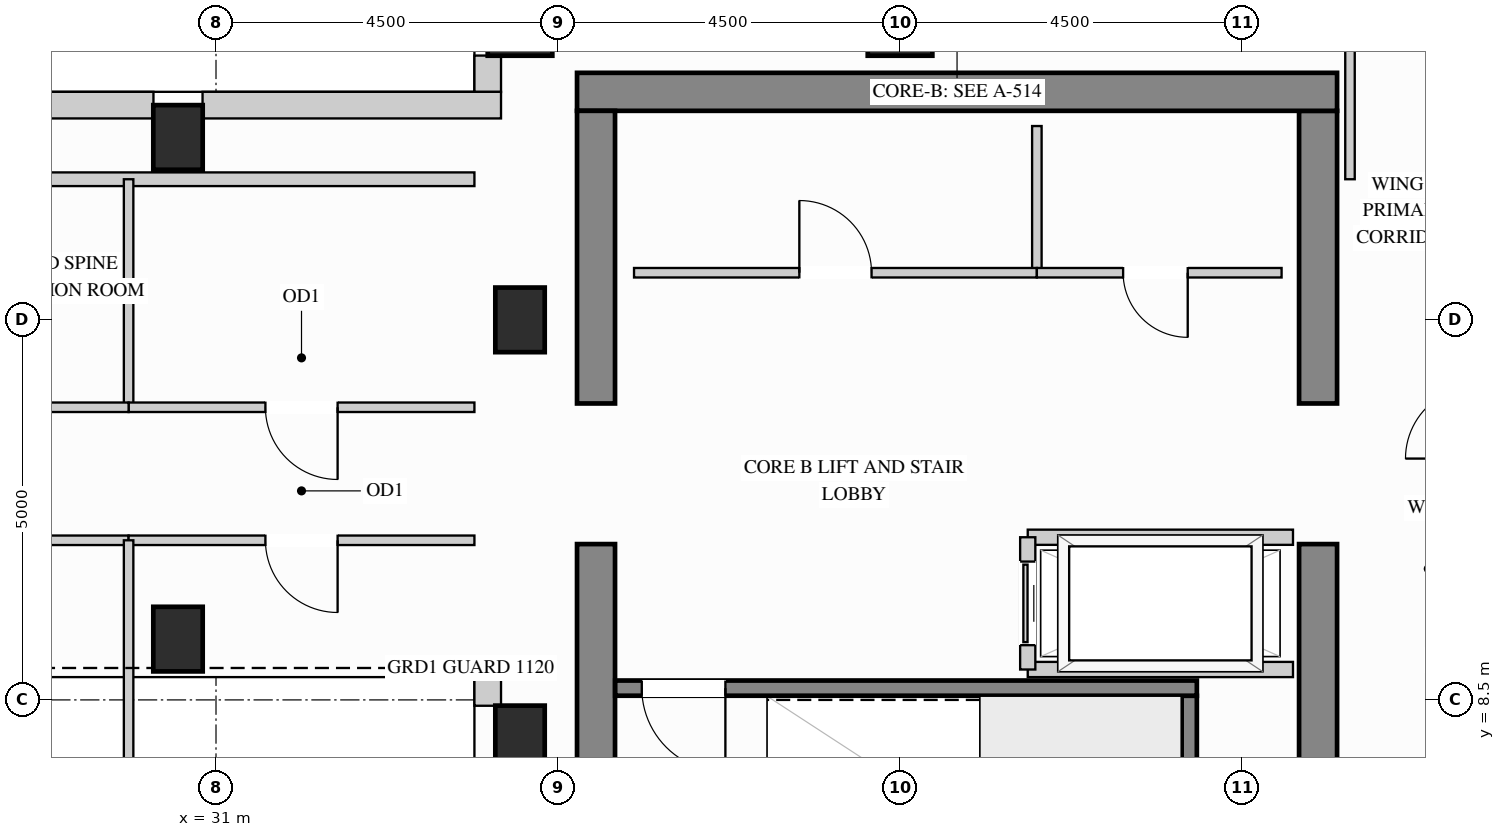
"""IFC4 building model, lengths in metres.
Left out: names, types, materials, properties, quantities, classifications, styles, units other than length and angle.
Written with IfcOpenShell. Run it as: python <this file> out.ifc"""

import sys

from ifc_helpers import new_model, si_unit, direction, frame, frame_2d, origin, origin_2d, place, context, subcontext, project, spatial, rectangle, extrude, source, transform, mapped, element, fill, save


model = new_model("IFC4")
c1 = context("Model", 3, precision=1e-05, world=origin(), true_north=direction((0.0, 1.0)))
c2 = subcontext(c1, "Body", "Model", "MODEL_VIEW")
j1 = project(units=[si_unit("LENGTHUNIT", "METRE"), si_unit("PLANEANGLEUNIT", "RADIAN")], contexts=[c1])
p1 = place(None, origin())
s1 = spatial("IfcSite", under=j1, at=p1, CompositionType="ELEMENT")
p2 = place(p1, origin())
s2 = spatial("IfcBuilding", under=s1, at=p2, CompositionType="ELEMENT")
p3 = place(p2, frame((0.0, 0.0, 241.2)))
s3 = spatial("IfcBuildingStorey", under=s2, at=p3, CompositionType="ELEMENT", Elevation=241.2)
m1 = source(origin(), c2, "Body", "SweptSolid", [
    extrude(rectangle(XDim=0.65, YDim=0.85, at=origin_2d()), origin(), (0.0, 0.0, 1.0), 3.4),
])
for number, where, z_axis, x_axis in (
    (1, (35.0, 13.5, 0.0), (0.0, 0.0, 1.0), (1.0, 0.0, 0.0)),
    (2, (35.0, 8.0, 0.0), (0.0, 0.0, 1.0), (1.0, 0.0, 0.0)),
    (3, (30.5, 15.9, 0.0), (0.0, 0.0, 1.0), (1.0, 0.0, 0.0)),
    (4, (30.5, 9.3, 0.0), (0.0, 0.0, 1.0), (1.0, 0.0, 0.0)),
):
    element("IfcColumn", number, at=place(p3, frame(where, z_axis=z_axis, x_axis=x_axis)), inside=s3, PredefinedType="COLUMN", context=c2, shape_type="MappedRepresentation", body=[
        mapped(m1, transform((0.0, 0.0, 0.0), x_axis=(1.0, 0.0, 0.0), y_axis=(0.0, 1.0, 0.0), z_axis=(0.0, 0.0, 1.0))),
    ])
m2 = source(origin(), c2, "Body", "SweptSolid", [
    extrude(rectangle(XDim=0.85, YDim=0.85, at=origin_2d()), origin(), (0.0, 0.0, 1.0), 3.4),
])
for number, where, z_axis, x_axis in (
    (5, (35.0, 17.4, 0.0), (0.0, 0.0, 1.0), (1.0, 0.0, 0.0)),
    (6, (40.0, 17.4, 0.0), (0.0, 0.0, 1.0), (1.0, 0.0, 0.0)),
):
    element("IfcColumn", number, at=place(p3, frame(where, z_axis=z_axis, x_axis=x_axis)), inside=s3, PredefinedType="COLUMN", context=c2, shape_type="MappedRepresentation", body=[
        mapped(m2, transform((0.0, 0.0, 0.0), x_axis=(1.0, 0.0, 0.0), y_axis=(0.0, 1.0, 0.0), z_axis=(0.0, 0.0, 1.0))),
    ])
m3 = source(origin(), c2, "Body", "SweptSolid", [
    extrude(rectangle(XDim=5.8, YDim=0.5, at=frame_2d((2.9, 0.0))), origin(), (0.0, 0.0, 1.0), 3.4),
])
p4 = place(p3, frame((45.5, 4.75, 0.0), z_axis=(0.0, 0.0, 1.0), x_axis=(0.0, 1.0, 0.0)))
e7 = element("IfcWall", 7, at=p4, inside=s3, PredefinedType="SHEAR", context=c2, shape_type="MappedRepresentation", body=[
    mapped(m3, transform((0.0, 0.0, 0.0), x_axis=(1.0, 0.0, 0.0), y_axis=(0.0, 1.0, 0.0), z_axis=(0.0, 0.0, 1.0))),
])
m4 = source(origin(), c2, "Body", "SweptSolid", [
    extrude(rectangle(XDim=3.85, YDim=0.5, at=frame_2d((1.925, 0.0))), origin(), (0.0, 0.0, 1.0), 3.4),
])
p5 = place(p3, frame((45.5, 12.4, 0.0), z_axis=(0.0, 0.0, 1.0), x_axis=(0.0, 1.0, 0.0)))
e8 = element("IfcWall", 8, at=p5, inside=s3, PredefinedType="SHEAR", context=c2, shape_type="MappedRepresentation", body=[
    mapped(m4, transform((0.0, 0.0, 0.0), x_axis=(1.0, 0.0, 0.0), y_axis=(0.0, 1.0, 0.0), z_axis=(0.0, 0.0, 1.0))),
])
m5 = source(origin(), c2, "Body", "SweptSolid", [
    extrude(rectangle(XDim=10.0, YDim=0.5, at=frame_2d((5.0, 0.0))), origin(), (0.0, 0.0, 1.0), 3.4),
])
p6 = place(p3, frame((35.75, 16.5, 0.0), z_axis=(0.0, 0.0, 1.0), x_axis=(1.0, 0.0, 0.0)))
e9 = element("IfcWall", 9, at=p6, inside=s3, PredefinedType="SHEAR", context=c2, shape_type="MappedRepresentation", body=[
    mapped(m5, transform((0.0, 0.0, 0.0), x_axis=(1.0, 0.0, 0.0), y_axis=(0.0, 1.0, 0.0), z_axis=(0.0, 0.0, 1.0))),
])
p7 = place(p3, frame((36.0, 4.75, 0.0), z_axis=(0.0, 0.0, 1.0), x_axis=(0.0, 1.0, 0.0)))
e10 = element("IfcWall", 10, at=p7, inside=s3, PredefinedType="SHEAR", context=c2, shape_type="MappedRepresentation", body=[
    mapped(m3, transform((0.0, 0.0, 0.0), x_axis=(1.0, 0.0, 0.0), y_axis=(0.0, 1.0, 0.0), z_axis=(0.0, 0.0, 1.0))),
])
p8 = place(p3, frame((36.0, 12.4, 0.0), z_axis=(0.0, 0.0, 1.0), x_axis=(0.0, 1.0, 0.0)))
e11 = element("IfcWall", 11, at=p8, inside=s3, PredefinedType="SHEAR", context=c2, shape_type="MappedRepresentation", body=[
    mapped(m4, transform((0.0, 0.0, 0.0), x_axis=(1.0, 0.0, 0.0), y_axis=(0.0, 1.0, 0.0), z_axis=(0.0, 0.0, 1.0))),
])
m6 = source(origin(), c2, "Body", "SweptSolid", [
    extrude(rectangle(XDim=0.379, YDim=0.35, at=frame_2d((0.189, 0.0))), origin(), (0.0, 0.0, 1.0), 3.385),
])
p9 = place(p3, frame((34.575, 8.802, 0.0), z_axis=(0.0, 0.0, 1.0), x_axis=(0.0, -1.0, 0.0)))
e12 = element("IfcWall", 12, at=p9, inside=s3, PredefinedType="SOLIDWALL", context=c2, shape_type="MappedRepresentation", body=[
    mapped(m6, transform((0.0, 0.0, 0.0), x_axis=(1.0, 0.0, 0.0), y_axis=(0.0, 1.0, 0.0), z_axis=(0.0, 0.0, 1.0))),
])
m7 = source(origin(), c2, "Body", "SweptSolid", [
    extrude(rectangle(XDim=0.479, YDim=0.35, at=frame_2d((0.24, 0.0))), origin(), (0.0, 0.0, 1.0), 3.385),
])
p10 = place(p3, frame((34.575, 16.977, 0.0), z_axis=(0.0, 0.0, 1.0), x_axis=(0.0, -1.0, 0.0)))
e13 = element("IfcWall", 13, at=p10, inside=s3, PredefinedType="SOLIDWALL", context=c2, shape_type="MappedRepresentation", body=[
    mapped(m7, transform((0.0, 0.0, 0.0), x_axis=(1.0, 0.0, 0.0), y_axis=(0.0, 1.0, 0.0), z_axis=(0.0, 0.0, 1.0))),
])
m8 = source(origin(), c2, "Body", "SweptSolid", [
    extrude(rectangle(XDim=3.927, YDim=0.35, at=frame_2d((1.963, 0.0))), origin(), (0.0, 0.0, 1.0), 3.385),
])
p11 = place(p3, frame((34.75, 16.325, 0.0), z_axis=(0.0, 0.0, 1.0), x_axis=(-1.0, 0.0, 0.0)))
e14 = element("IfcWall", 14, at=p11, inside=s3, PredefinedType="SOLIDWALL", context=c2, shape_type="MappedRepresentation", body=[
    mapped(m8, transform((0.0, 0.0, 0.0), x_axis=(1.0, 0.0, 0.0), y_axis=(0.0, 1.0, 0.0), z_axis=(0.0, 0.0, 1.0))),
])
m9 = source(origin(), c2, "Body", "SweptSolid", [
    extrude(rectangle(XDim=6.454, YDim=0.35, at=frame_2d((3.227, 0.0))), origin(), (0.0, 0.0, 1.0), 3.385),
])
p12 = place(p3, frame((30.177, 16.325, 0.0), z_axis=(0.0, 0.0, 1.0), x_axis=(-1.0, 0.0, 0.0)))
e15 = element("IfcWall", 15, at=p12, inside=s3, PredefinedType="SOLIDWALL", context=c2, shape_type="MappedRepresentation", body=[
    mapped(m9, transform((0.0, 0.0, 0.0), x_axis=(1.0, 0.0, 0.0), y_axis=(0.0, 1.0, 0.0), z_axis=(0.0, 0.0, 1.0))),
])
m10 = source(origin(), c2, "Body", "SweptSolid", [
    extrude(rectangle(XDim=15.25, YDim=0.18, at=frame_2d((7.625, 0.0))), origin(), (0.0, 0.0, 1.0), 3.385),
])
p13 = place(p3, frame((19.15, 15.35, 0.0), z_axis=(0.0, 0.0, 1.0), x_axis=(1.0, 0.0, 0.0)))
e16 = element("IfcWall", 16, at=p13, inside=s3, PredefinedType="PARTITIONING", context=c2, shape_type="MappedRepresentation", body=[
    mapped(m10, transform((0.0, 0.0, 0.0), x_axis=(1.0, 0.0, 0.0), y_axis=(0.0, 1.0, 0.0), z_axis=(0.0, 0.0, 1.0))),
])
m11 = source(origin(), c2, "Body", "SweptSolid", [
    extrude(rectangle(XDim=1.93, YDim=0.125, at=frame_2d((0.965, 0.0))), origin(), (0.0, 0.0, 1.0), 3.385),
])
p14 = place(p3, frame((41.8, 14.12, 0.0), z_axis=(0.0, 0.0, 1.0), x_axis=(0.0, 1.0, 0.0)))
e17 = element("IfcWall", 17, at=p14, inside=s3, PredefinedType="PARTITIONING", context=c2, shape_type="MappedRepresentation", body=[
    mapped(m11, transform((0.0, 0.0, 0.0), x_axis=(1.0, 0.0, 0.0), y_axis=(0.0, 1.0, 0.0), z_axis=(0.0, 0.0, 1.0))),
])
p15 = place(p3, frame((36.5, 14.12, 0.0), z_axis=(0.0, 0.0, 1.0), x_axis=(1.0, 0.0, 0.0)))
e18 = element("IfcWall", 18, at=p15, inside=s3, PredefinedType="PARTITIONING", context=c2, shape_type="SweptSolid", body=[
    extrude(rectangle(XDim=5.3, YDim=0.125, at=frame_2d((2.65, 0.0))), origin(), (0.0, 0.0, 1.0), 3.385),
])
p16 = place(p15, frame((2.175, 0.0, 0.0)))
e19 = element("IfcOpeningElement", 19, at=p16, cuts=e18, PredefinedType="OPENING", context=c2, shape_type="SweptSolid", body=[
    extrude(rectangle(XDim=0.95, YDim=2.15, at=frame_2d((0.475, 1.075))), frame((0.0, 0.073, 0.0), z_axis=(0.0, -1.0, 0.0), x_axis=(1.0, 0.0, 0.0)), (0.0, 0.0, 1.0), 0.145),
])
p17 = place(p3, frame((41.8, 14.12, 0.0), z_axis=(0.0, 0.0, 1.0), x_axis=(1.0, 0.0, 0.0)))
e20 = element("IfcWall", 20, at=p17, inside=s3, PredefinedType="PARTITIONING", context=c2, shape_type="SweptSolid", body=[
    extrude(rectangle(XDim=3.22, YDim=0.125, at=frame_2d((1.61, 0.0))), origin(), (0.0, 0.0, 1.0), 3.385),
])
p18 = place(p17, frame((1.135, 0.0, 0.0)))
e21 = element("IfcOpeningElement", 21, at=p18, cuts=e20, PredefinedType="OPENING", context=c2, shape_type="SweptSolid", body=[
    extrude(rectangle(XDim=0.85, YDim=2.1, at=frame_2d((0.425, 1.05))), frame((0.0, 0.073, 0.0), z_axis=(0.0, -1.0, 0.0), x_axis=(1.0, 0.0, 0.0)), (0.0, 0.0, 1.0), 0.145),
])
m12 = source(origin(), c2, "Body", "SweptSolid", [
    extrude(rectangle(XDim=2.298, YDim=0.125, at=frame_2d((1.149, 0.0))), origin(), (0.0, 0.0, 1.0), 3.385),
])
p19 = place(p3, frame((45.92, 15.35, 0.0), z_axis=(0.0, 0.0, 1.0), x_axis=(0.0, 1.0, 0.0)))
e22 = element("IfcWall", 22, at=p19, inside=s3, PredefinedType="PARTITIONING", context=c2, shape_type="MappedRepresentation", body=[
    mapped(m12, transform((0.0, 0.0, 0.0), x_axis=(1.0, 0.0, 0.0), y_axis=(0.0, 1.0, 0.0), z_axis=(0.0, 0.0, 1.0))),
])
m13 = source(origin(), c2, "Body", "SweptSolid", [
    extrude(rectangle(XDim=3.0, YDim=0.125, at=frame_2d((1.5, 0.0))), origin(), (0.0, 0.0, 1.0), 3.385),
])
p20 = place(p3, frame((29.85, 12.35, 0.0), z_axis=(0.0, 0.0, 1.0), x_axis=(0.0, 1.0, 0.0)))
e23 = element("IfcWall", 23, at=p20, inside=s3, PredefinedType="PARTITIONING", context=c2, shape_type="MappedRepresentation", body=[
    mapped(m13, transform((0.0, 0.0, 0.0), x_axis=(1.0, 0.0, 0.0), y_axis=(0.0, 1.0, 0.0), z_axis=(0.0, 0.0, 1.0))),
])
p21 = place(p3, frame((29.85, 12.35, 0.0), z_axis=(0.0, 0.0, 1.0), x_axis=(1.0, 0.0, 0.0)))
e24 = element("IfcWall", 24, at=p21, inside=s3, PredefinedType="PARTITIONING", context=c2, shape_type="SweptSolid", body=[
    extrude(rectangle(XDim=4.55, YDim=0.125, at=frame_2d((2.275, 0.0))), origin(), (0.0, 0.0, 1.0), 3.385),
])
p22 = place(p21, frame((1.8, 0.0, 0.0)))
e25 = element("IfcOpeningElement", 25, at=p22, cuts=e24, PredefinedType="OPENING", context=c2, shape_type="SweptSolid", body=[
    extrude(rectangle(XDim=0.95, YDim=2.15, at=frame_2d((0.475, 1.075))), frame((0.0, 0.073, 0.0), z_axis=(0.0, -1.0, 0.0), x_axis=(1.0, 0.0, 0.0)), (0.0, 0.0, 1.0), 0.145),
])
p23 = place(p3, frame((24.05, 12.35, 0.0), z_axis=(0.0, 0.0, 1.0), x_axis=(1.0, 0.0, 0.0)))
e26 = element("IfcWall", 26, at=p23, inside=s3, PredefinedType="PARTITIONING", context=c2, shape_type="SweptSolid", body=[
    extrude(rectangle(XDim=5.8, YDim=0.125, at=frame_2d((2.9, 0.0))), origin(), (0.0, 0.0, 1.0), 3.385),
])
p24 = place(p23, frame((2.425, 0.0, 0.0)))
e27 = element("IfcOpeningElement", 27, at=p24, cuts=e26, PredefinedType="OPENING", context=c2, shape_type="SweptSolid", body=[
    extrude(rectangle(XDim=0.95, YDim=2.15, at=frame_2d((0.475, 1.075))), frame((0.0, 0.073, 0.0), z_axis=(0.0, -1.0, 0.0), x_axis=(1.0, 0.0, 0.0)), (0.0, 0.0, 1.0), 0.145),
])
p25 = place(p3, frame((23.85, 10.6, 0.0), z_axis=(0.0, 0.0, 1.0), x_axis=(1.0, 0.0, 0.0)))
e28 = element("IfcWall", 28, at=p25, inside=s3, PredefinedType="PARTITIONING", context=c2, shape_type="SweptSolid", body=[
    extrude(rectangle(XDim=6.0, YDim=0.125, at=frame_2d((3.0, 0.0))), origin(), (0.0, 0.0, 1.0), 3.385),
])
p26 = place(p25, frame((2.525, 0.0, 0.0)))
e29 = element("IfcOpeningElement", 29, at=p26, cuts=e28, PredefinedType="OPENING", context=c2, shape_type="SweptSolid", body=[
    extrude(rectangle(XDim=0.95, YDim=2.15, at=frame_2d((0.475, 1.075))), frame((0.0, 0.073, 0.0), z_axis=(0.0, -1.0, 0.0), x_axis=(1.0, 0.0, 0.0)), (0.0, 0.0, 1.0), 0.145),
])
p27 = place(p3, frame((29.85, 10.6, 0.0), z_axis=(0.0, 0.0, 1.0), x_axis=(1.0, 0.0, 0.0)))
e30 = element("IfcWall", 30, at=p27, inside=s3, PredefinedType="PARTITIONING", context=c2, shape_type="SweptSolid", body=[
    extrude(rectangle(XDim=4.55, YDim=0.125, at=frame_2d((2.275, 0.0))), origin(), (0.0, 0.0, 1.0), 3.385),
])
p28 = place(p27, frame((1.8, 0.0, 0.0)))
e31 = element("IfcOpeningElement", 31, at=p28, cuts=e30, PredefinedType="OPENING", context=c2, shape_type="SweptSolid", body=[
    extrude(rectangle(XDim=0.95, YDim=2.15, at=frame_2d((0.475, 1.075))), frame((0.0, 0.073, 0.0), z_axis=(0.0, -1.0, 0.0), x_axis=(1.0, 0.0, 0.0)), (0.0, 0.0, 1.0), 0.145),
])
m14 = source(origin(), c2, "Body", "SweptSolid", [
    extrude(rectangle(XDim=10.25, YDim=0.125, at=frame_2d((5.125, 0.0))), origin(), (0.0, 0.0, 1.0), 3.385),
])
p29 = place(p3, frame((29.85, 0.35, 0.0), z_axis=(0.0, 0.0, 1.0), x_axis=(0.0, 1.0, 0.0)))
e32 = element("IfcWall", 32, at=p29, inside=s3, PredefinedType="PARTITIONING", context=c2, shape_type="MappedRepresentation", body=[
    mapped(m14, transform((0.0, 0.0, 0.0), x_axis=(1.0, 0.0, 0.0), y_axis=(0.0, 1.0, 0.0), z_axis=(0.0, 0.0, 1.0))),
])
m15 = source(origin(), c2, "Body", "SweptSolid", [
    extrude(rectangle(XDim=3.49, YDim=0.2, at=frame_2d((1.745, 0.0))), origin(), (0.0, 0.0, 1.0), 3.385),
])
for number, where, z_axis, x_axis in (
    (33, (41.68, 10.64, 0.0), (0.0, 0.0, 1.0), (1.0, 0.0, 0.0)),
    (34, (41.68, 8.9, 0.0), (0.0, 0.0, 1.0), (1.0, 0.0, 0.0)),
):
    element("IfcWall", number, at=place(p3, frame(where, z_axis=z_axis, x_axis=x_axis)), inside=s3, PredefinedType="PARTITIONING", context=c2, shape_type="MappedRepresentation", body=[
        mapped(m15, transform((0.0, 0.0, 0.0), x_axis=(1.0, 0.0, 0.0), y_axis=(0.0, 1.0, 0.0), z_axis=(0.0, 0.0, 1.0))),
    ])
p30 = place(p3, frame((41.68, 8.9, 0.0), z_axis=(0.0, 0.0, 1.0), x_axis=(0.0, 1.0, 0.0)))
e35 = element("IfcWall", 35, at=p30, inside=s3, PredefinedType="PARTITIONING", context=c2, shape_type="SweptSolid", body=[
    extrude(rectangle(XDim=1.74, YDim=0.2, at=frame_2d((0.87, 0.0))), origin(), (0.0, 0.0, 1.0), 3.385),
])
p31 = place(p30, frame((0.32, 0.0, 0.0)))
e36 = element("IfcOpeningElement", 36, at=p31, cuts=e35, PredefinedType="OPENING", context=c2, shape_type="SweptSolid", body=[
    extrude(rectangle(XDim=1.1, YDim=2.2, at=frame_2d((0.55, 1.1))), frame((0.0, 0.11, 0.0), z_axis=(0.0, -1.0, 0.0), x_axis=(1.0, 0.0, 0.0)), (0.0, 0.0, 1.0), 0.22),
])
m16 = source(origin(), c2, "Body", "SweptSolid", [
    extrude(rectangle(XDim=3.803, YDim=0.2, at=frame_2d((1.901, 0.0))), origin(), (0.0, 0.0, 1.0), 3.4),
])
p32 = place(p3, frame((43.805, 4.752, 0.0), z_axis=(0.0, 0.0, 1.0), x_axis=(0.0, 1.0, 0.0)))
e37 = element("IfcWall", 37, at=p32, inside=s3, PredefinedType="SHEAR", context=c2, shape_type="MappedRepresentation", body=[
    mapped(m16, transform((0.0, 0.0, 0.0), x_axis=(1.0, 0.0, 0.0), y_axis=(0.0, 1.0, 0.0), z_axis=(0.0, 0.0, 1.0))),
])
p33 = place(p3, frame((36.252, 8.655, 0.0), z_axis=(0.0, 0.0, 1.0), x_axis=(1.0, 0.0, 0.0)))
e38 = element("IfcWall", 38, at=p33, inside=s3, PredefinedType="SHEAR", context=c2, shape_type="SweptSolid", body=[
    extrude(rectangle(XDim=7.653, YDim=0.2, at=frame_2d((3.827, 0.0))), origin(), (0.0, 0.0, 1.0), 3.4),
])
p34 = place(p33, frame((0.35, 0.0, 0.0)))
e39 = element("IfcOpeningElement", 39, at=p34, cuts=e38, PredefinedType="OPENING", context=c2, shape_type="SweptSolid", body=[
    extrude(rectangle(XDim=1.1, YDim=2.15, at=frame_2d((0.55, 1.075))), frame((0.0, 0.11, 0.0), z_axis=(0.0, -1.0, 0.0), x_axis=(1.0, 0.0, 0.0)), (0.0, 0.0, 1.0), 0.22),
])
m17 = source(origin(), c2, "Body", "SweptSolid", [
    extrude(rectangle(XDim=1.1, YDim=2.2, at=frame_2d((0.55, 1.1))), frame((0.0, 0.025, 0.0), z_axis=(0.0, -1.0, 0.0), x_axis=(1.0, 0.0, 0.0)), (0.0, 0.0, 1.0), 0.05),
])
p35 = place(p31, origin())
e40 = element("IfcDoor", 40, at=p35, inside=s3, OperationType="SLIDING_TO_LEFT", PredefinedType="DOOR", context=c2, shape_type="MappedRepresentation", body=[
    mapped(m17, transform((0.0, 0.0, 0.0), x_axis=(1.0, 0.0, 0.0), y_axis=(0.0, 1.0, 0.0), z_axis=(0.0, 0.0, 1.0))),
])
fill(e36, e40)
m18 = source(origin(), c2, "Body", "SweptSolid", [
    extrude(rectangle(XDim=0.95, YDim=2.15, at=frame_2d((0.475, 1.075))), frame((0.0, 0.025, 0.0), z_axis=(0.0, -1.0, 0.0), x_axis=(1.0, 0.0, 0.0)), (0.0, 0.0, 1.0), 0.05),
])
p36 = place(p16, origin())
e41 = element("IfcDoor", 41, at=p36, inside=s3, OperationType="SINGLE_SWING_LEFT", PredefinedType="DOOR", context=c2, shape_type="MappedRepresentation", body=[
    mapped(m18, transform((0.0, 0.0, 0.0), x_axis=(1.0, 0.0, 0.0), y_axis=(0.0, 1.0, 0.0), z_axis=(0.0, 0.0, 1.0))),
])
fill(e19, e41)
p37 = place(p22, origin())
e42 = element("IfcDoor", 42, at=p37, inside=s3, OperationType="SINGLE_SWING_RIGHT", PredefinedType="DOOR", context=c2, shape_type="MappedRepresentation", body=[
    mapped(m18, transform((0.0, 0.0, 0.0), x_axis=(1.0, 0.0, 0.0), y_axis=(0.0, 1.0, 0.0), z_axis=(0.0, 0.0, 1.0))),
])
fill(e25, e42)
p38 = place(p28, origin())
e43 = element("IfcDoor", 43, at=p38, inside=s3, OperationType="SINGLE_SWING_RIGHT", PredefinedType="DOOR", context=c2, shape_type="MappedRepresentation", body=[
    mapped(m18, transform((0.0, 0.0, 0.0), x_axis=(1.0, 0.0, 0.0), y_axis=(0.0, 1.0, 0.0), z_axis=(0.0, 0.0, 1.0))),
])
fill(e31, e43)
m19 = source(origin(), c2, "Body", "SweptSolid", [
    extrude(rectangle(XDim=0.85, YDim=2.1, at=frame_2d((0.425, 1.05))), frame((0.0, 0.025, 0.0), z_axis=(0.0, -1.0, 0.0), x_axis=(1.0, 0.0, 0.0)), (0.0, 0.0, 1.0), 0.05),
])
p39 = place(p18, origin())
e44 = element("IfcDoor", 44, at=p39, inside=s3, OperationType="SINGLE_SWING_RIGHT", PredefinedType="DOOR", context=c2, shape_type="MappedRepresentation", body=[
    mapped(m19, transform((0.0, 0.0, 0.0), x_axis=(1.0, 0.0, 0.0), y_axis=(0.0, 1.0, 0.0), z_axis=(0.0, 0.0, 1.0))),
])
fill(e21, e44)
m20 = source(origin(), c2, "Body", "SweptSolid", [
    extrude(rectangle(XDim=1.1, YDim=2.15, at=frame_2d((0.55, 1.075))), frame((0.0, 0.025, 0.0), z_axis=(0.0, -1.0, 0.0), x_axis=(1.0, 0.0, 0.0)), (0.0, 0.0, 1.0), 0.05),
])
p40 = place(p34, origin())
e45 = element("IfcDoor", 45, at=p40, inside=s3, OperationType="SINGLE_SWING_RIGHT", PredefinedType="DOOR", context=c2, shape_type="MappedRepresentation", body=[
    mapped(m20, transform((0.0, 0.0, 0.0), x_axis=(1.0, 0.0, 0.0), y_axis=(0.0, 1.0, 0.0), z_axis=(0.0, 0.0, 1.0))),
])
fill(e39, e45)
save(model, sys.argv[1])
